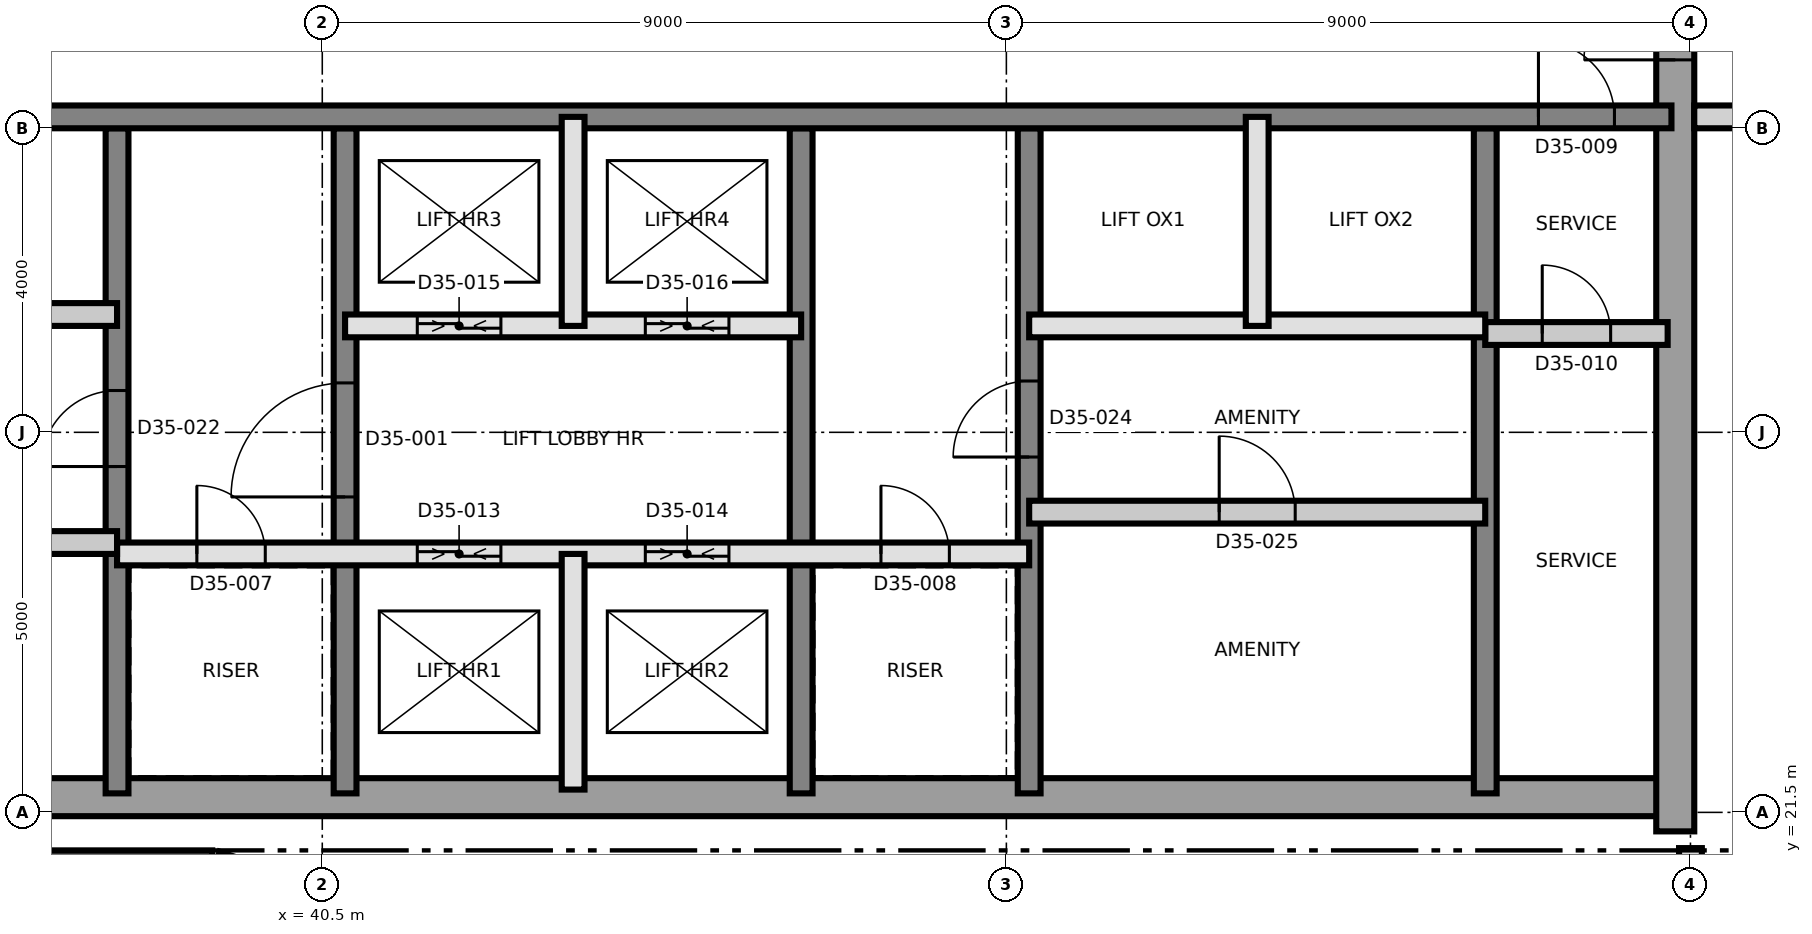
"""IFC4 building model, lengths in metres.
Left out: names, types, materials, properties, quantities, classifications, styles, units other than length and angle.
Written with IfcOpenShell. Run it as: python <this file> out.ifc"""

import sys

from ifc_helpers import new_model, si_unit, direction, frame, frame_2d, origin, place, context, subcontext, project, spatial, rectangle, extrude, element, fill, save


model = new_model("IFC4")
c1 = context("Model", 3, precision=1e-05, world=origin(), true_north=direction((0.0, 1.0)))
c2 = subcontext(c1, "Body", "Model", "MODEL_VIEW")
j1 = project(units=[si_unit("LENGTHUNIT", "METRE"), si_unit("PLANEANGLEUNIT", "RADIAN")], contexts=[c1])
p1 = place(None, origin())
s1 = spatial("IfcSite", under=j1, at=p1, CompositionType="ELEMENT")
p2 = place(p1, origin())
s2 = spatial("IfcBuilding", under=s1, at=p2, CompositionType="ELEMENT")
p3 = place(p2, frame((0.0, 0.0, 195.8)))
s3 = spatial("IfcBuildingStorey", under=s2, at=p3, CompositionType="ELEMENT", Elevation=195.8)
p4 = place(p3, frame((31.25, 21.7, 0.0), z_axis=(0.0, 0.0, 1.0), x_axis=(1.0, 0.0, 0.0)))
e1 = element("IfcWall", 1, at=p4, inside=s3, PredefinedType="SHEAR", context=c2, shape_type="SweptSolid", body=[
    extrude(rectangle(XDim=27.0, YDim=0.5, at=frame_2d((13.5, 0.0))), origin(), (0.0, 0.0, 1.0), 3.7),
])
p5 = place(p3, frame((58.3, 21.25, 0.0), z_axis=(0.0, 0.0, 1.0), x_axis=(0.0, 1.0, 0.0)))
e2 = element("IfcWall", 2, at=p5, inside=s3, PredefinedType="SHEAR", context=c2, shape_type="SweptSolid", body=[
    extrude(rectangle(XDim=18.5, YDim=0.5, at=frame_2d((9.25, 0.0))), origin(), (0.0, 0.0, 1.0), 3.7),
])
p6 = place(p5, frame((10.15, 0.0, 0.0)))
e3 = element("IfcOpeningElement", 3, at=p6, cuts=e2, PredefinedType="OPENING", context=c2, shape_type="SweptSolid", body=[
    extrude(rectangle(XDim=1.2, YDim=2.1, at=frame_2d((0.6, 1.05))), frame((0.0, 0.26, 0.0), z_axis=(0.0, -1.0, 0.0), x_axis=(1.0, 0.0, 0.0)), (0.0, 0.0, 1.0), 0.52),
])
p7 = place(p3, frame((37.8, 21.75, 0.0), z_axis=(0.0, 0.0, 1.0), x_axis=(0.0, 1.0, 0.0)))
e4 = element("IfcWall", 4, at=p7, inside=s3, PredefinedType="SHEAR", context=c2, shape_type="SweptSolid", body=[
    extrude(rectangle(XDim=8.75, YDim=0.3, at=frame_2d((4.375, 0.0))), origin(), (0.0, 0.0, 1.0), 3.7),
])
p8 = place(p7, frame((4.3, 0.0, 0.0)))
e5 = element("IfcOpeningElement", 5, at=p8, cuts=e4, PredefinedType="OPENING", context=c2, shape_type="SweptSolid", body=[
    extrude(rectangle(XDim=1.0, YDim=2.1, at=frame_2d((0.5, 1.05))), frame((0.0, 0.16, 0.0), z_axis=(0.0, -1.0, 0.0), x_axis=(1.0, 0.0, 0.0)), (0.0, 0.0, 1.0), 0.32),
])
p9 = place(p3, frame((40.8, 21.75, 0.0), z_axis=(0.0, 0.0, 1.0), x_axis=(0.0, 1.0, 0.0)))
e6 = element("IfcWall", 6, at=p9, inside=s3, PredefinedType="SHEAR", context=c2, shape_type="SweptSolid", body=[
    extrude(rectangle(XDim=8.75, YDim=0.3, at=frame_2d((4.375, 0.0))), origin(), (0.0, 0.0, 1.0), 3.7),
])
p10 = place(p9, frame((3.9, 0.0, 0.0)))
e7 = element("IfcOpeningElement", 7, at=p10, cuts=e6, PredefinedType="OPENING", context=c2, shape_type="SweptSolid", body=[
    extrude(rectangle(XDim=1.5, YDim=2.1, at=frame_2d((0.75, 1.05))), frame((0.0, 0.16, 0.0), z_axis=(0.0, -1.0, 0.0), x_axis=(1.0, 0.0, 0.0)), (0.0, 0.0, 1.0), 0.32),
])
p11 = place(p3, frame((46.8, 21.75, 0.0), z_axis=(0.0, 0.0, 1.0), x_axis=(0.0, 1.0, 0.0)))
e8 = element("IfcWall", 8, at=p11, inside=s3, PredefinedType="SHEAR", context=c2, shape_type="SweptSolid", body=[
    extrude(rectangle(XDim=8.75, YDim=0.3, at=frame_2d((4.375, 0.0))), origin(), (0.0, 0.0, 1.0), 3.7),
])
p12 = place(p3, frame((49.8, 21.75, 0.0), z_axis=(0.0, 0.0, 1.0), x_axis=(0.0, 1.0, 0.0)))
e9 = element("IfcWall", 9, at=p12, inside=s3, PredefinedType="SHEAR", context=c2, shape_type="SweptSolid", body=[
    extrude(rectangle(XDim=8.75, YDim=0.3, at=frame_2d((4.375, 0.0))), origin(), (0.0, 0.0, 1.0), 3.7),
])
p13 = place(p12, frame((4.425, 0.0, 0.0)))
e10 = element("IfcOpeningElement", 10, at=p13, cuts=e9, PredefinedType="OPENING", context=c2, shape_type="SweptSolid", body=[
    extrude(rectangle(XDim=1.0, YDim=2.1, at=frame_2d((0.5, 1.05))), frame((0.0, 0.16, 0.0), z_axis=(0.0, -1.0, 0.0), x_axis=(1.0, 0.0, 0.0)), (0.0, 0.0, 1.0), 0.32),
])
p14 = place(p3, frame((55.8, 21.75, 0.0), z_axis=(0.0, 0.0, 1.0), x_axis=(0.0, 1.0, 0.0)))
e11 = element("IfcWall", 11, at=p14, inside=s3, PredefinedType="SHEAR", context=c2, shape_type="SweptSolid", body=[
    extrude(rectangle(XDim=8.75, YDim=0.3, at=frame_2d((4.375, 0.0))), origin(), (0.0, 0.0, 1.0), 3.7),
])
p15 = place(p3, frame((31.75, 30.65, 0.0), z_axis=(0.0, 0.0, 1.0), x_axis=(1.0, 0.0, 0.0)))
e12 = element("IfcWall", 12, at=p15, inside=s3, PredefinedType="SHEAR", context=c2, shape_type="SweptSolid", body=[
    extrude(rectangle(XDim=26.5, YDim=0.3, at=frame_2d((13.25, 0.0))), origin(), (0.0, 0.0, 1.0), 3.7),
])
p16 = place(p15, frame((24.75, 0.0, 0.0)))
e13 = element("IfcOpeningElement", 13, at=p16, cuts=e12, PredefinedType="OPENING", context=c2, shape_type="SweptSolid", body=[
    extrude(rectangle(XDim=1.0, YDim=2.1, at=frame_2d((0.5, 1.05))), frame((0.0, 0.16, 0.0), z_axis=(0.0, -1.0, 0.0), x_axis=(1.0, 0.0, 0.0)), (0.0, 0.0, 1.0), 0.32),
])
p17 = place(p15, frame((4.05, 0.0, 0.0)))
e14 = element("IfcOpeningElement", 14, at=p17, cuts=e12, PredefinedType="OPENING", context=c2, shape_type="SweptSolid", body=[
    extrude(rectangle(XDim=1.0, YDim=2.1, at=frame_2d((0.5, 1.05))), frame((0.0, 0.16, 0.0), z_axis=(0.0, -1.0, 0.0), x_axis=(1.0, 0.0, 0.0)), (0.0, 0.0, 1.0), 0.32),
])
p18 = place(p3, frame((31.36, 20.85, 0.0), z_axis=(0.0, 0.0, 1.0), x_axis=(1.0, 0.0, 0.0)))
e15 = element("IfcWall", 15, at=p18, inside=s3, PredefinedType="SOLIDWALL", context=c2, shape_type="SweptSolid", body=[
    extrude(rectangle(XDim=7.693, YDim=0.3, at=frame_2d((3.846, 0.0))), origin(), (0.0, 0.0, 1.0), 3.4),
])
p19 = place(p3, frame((39.101, 20.842, 0.0), z_axis=(0.0, 0.0, 1.0), x_axis=(0.946930456305, -0.32143850255, 0.0)))
e16 = element("IfcWall", 16, at=p19, inside=s3, PredefinedType="SOLIDWALL", context=c2, shape_type="SweptSolid", body=[
    extrude(rectangle(XDim=1.32, YDim=0.3, at=frame_2d((0.66, 0.0))), origin(), (0.0, 0.0, 1.0), 3.4),
])
p20 = place(p3, frame((37.8, 24.9, 0.0), z_axis=(0.0, 0.0, 1.0), x_axis=(1.0, 0.0, 0.0)))
e17 = element("IfcWall", 17, at=p20, inside=s3, PredefinedType="SOLIDWALL", context=c2, shape_type="SweptSolid", body=[
    extrude(rectangle(XDim=12.0, YDim=0.3, at=frame_2d((6.0, 0.0))), origin(), (0.0, 0.0, 1.0), 3.4),
])
p21 = place(p20, frame((1.05, 0.0, 0.0)))
e18 = element("IfcOpeningElement", 18, at=p21, cuts=e17, PredefinedType="OPENING", context=c2, shape_type="SweptSolid", body=[
    extrude(rectangle(XDim=0.9, YDim=2.1, at=frame_2d((0.45, 1.05))), frame((0.0, 0.16, 0.0), z_axis=(0.0, -1.0, 0.0), x_axis=(1.0, 0.0, 0.0)), (0.0, 0.0, 1.0), 0.32),
])
p22 = place(p20, frame((10.05, 0.0, 0.0)))
e19 = element("IfcOpeningElement", 19, at=p22, cuts=e17, PredefinedType="OPENING", context=c2, shape_type="SweptSolid", body=[
    extrude(rectangle(XDim=0.9, YDim=2.1, at=frame_2d((0.45, 1.05))), frame((0.0, 0.16, 0.0), z_axis=(0.0, -1.0, 0.0), x_axis=(1.0, 0.0, 0.0)), (0.0, 0.0, 1.0), 0.32),
])
p23 = place(p20, frame((3.95, 0.0, 0.0)))
e20 = element("IfcOpeningElement", 20, at=p23, cuts=e17, PredefinedType="OPENING", context=c2, shape_type="SweptSolid", body=[
    extrude(rectangle(XDim=1.1, YDim=2.4, at=frame_2d((0.55, 1.2))), frame((0.0, 0.16, 0.0), z_axis=(0.0, -1.0, 0.0), x_axis=(1.0, 0.0, 0.0)), (0.0, 0.0, 1.0), 0.32),
])
p24 = place(p20, frame((6.95, 0.0, 0.0)))
e21 = element("IfcOpeningElement", 21, at=p24, cuts=e17, PredefinedType="OPENING", context=c2, shape_type="SweptSolid", body=[
    extrude(rectangle(XDim=1.1, YDim=2.4, at=frame_2d((0.55, 1.2))), frame((0.0, 0.16, 0.0), z_axis=(0.0, -1.0, 0.0), x_axis=(1.0, 0.0, 0.0)), (0.0, 0.0, 1.0), 0.32),
])
p25 = place(p3, frame((31.8, 25.05, 0.0), z_axis=(0.0, 0.0, 1.0), x_axis=(1.0, 0.0, 0.0)))
e22 = element("IfcWall", 22, at=p25, inside=s3, PredefinedType="PARTITIONING", context=c2, shape_type="SweptSolid", body=[
    extrude(rectangle(XDim=6.0, YDim=0.3, at=frame_2d((3.0, 0.0))), origin(), (0.0, 0.0, 1.0), 3.4),
])
p26 = place(p25, frame((2.5, 0.0, 0.0)))
e23 = element("IfcOpeningElement", 23, at=p26, cuts=e22, PredefinedType="OPENING", context=c2, shape_type="SweptSolid", body=[
    extrude(rectangle(XDim=1.0, YDim=2.1, at=frame_2d((0.5, 1.05))), frame((0.0, 0.16, 0.0), z_axis=(0.0, -1.0, 0.0), x_axis=(1.0, 0.0, 0.0)), (0.0, 0.0, 1.0), 0.32),
])
p27 = place(p3, frame((49.8, 25.45, 0.0), z_axis=(0.0, 0.0, 1.0), x_axis=(1.0, 0.0, 0.0)))
e24 = element("IfcWall", 24, at=p27, inside=s3, PredefinedType="PARTITIONING", context=c2, shape_type="SweptSolid", body=[
    extrude(rectangle(XDim=6.0, YDim=0.3, at=frame_2d((3.0, 0.0))), origin(), (0.0, 0.0, 1.0), 3.4),
])
p28 = place(p27, frame((2.5, 0.0, 0.0)))
e25 = element("IfcOpeningElement", 25, at=p28, cuts=e24, PredefinedType="OPENING", context=c2, shape_type="SweptSolid", body=[
    extrude(rectangle(XDim=1.0, YDim=2.1, at=frame_2d((0.5, 1.05))), frame((0.0, 0.16, 0.0), z_axis=(0.0, -1.0, 0.0), x_axis=(1.0, 0.0, 0.0)), (0.0, 0.0, 1.0), 0.32),
])
p29 = place(p3, frame((55.8, 27.8, 0.0), z_axis=(0.0, 0.0, 1.0), x_axis=(1.0, 0.0, 0.0)))
e26 = element("IfcWall", 26, at=p29, inside=s3, PredefinedType="PARTITIONING", context=c2, shape_type="SweptSolid", body=[
    extrude(rectangle(XDim=2.4, YDim=0.3, at=frame_2d((1.2, 0.0))), origin(), (0.0, 0.0, 1.0), 3.4),
])
p30 = place(p29, frame((0.75, 0.0, 0.0)))
e27 = element("IfcOpeningElement", 27, at=p30, cuts=e26, PredefinedType="OPENING", context=c2, shape_type="SweptSolid", body=[
    extrude(rectangle(XDim=0.9, YDim=2.1, at=frame_2d((0.45, 1.05))), frame((0.0, 0.16, 0.0), z_axis=(0.0, -1.0, 0.0), x_axis=(1.0, 0.0, 0.0)), (0.0, 0.0, 1.0), 0.32),
])
p31 = place(p3, frame((40.8, 27.9, 0.0), z_axis=(0.0, 0.0, 1.0), x_axis=(1.0, 0.0, 0.0)))
e28 = element("IfcWall", 28, at=p31, inside=s3, PredefinedType="SOLIDWALL", context=c2, shape_type="SweptSolid", body=[
    extrude(rectangle(XDim=6.0, YDim=0.3, at=frame_2d((3.0, 0.0))), origin(), (0.0, 0.0, 1.0), 3.4),
])
p32 = place(p31, frame((0.95, 0.0, 0.0)))
e29 = element("IfcOpeningElement", 29, at=p32, cuts=e28, PredefinedType="OPENING", context=c2, shape_type="SweptSolid", body=[
    extrude(rectangle(XDim=1.1, YDim=2.4, at=frame_2d((0.55, 1.2))), frame((0.0, 0.16, 0.0), z_axis=(0.0, -1.0, 0.0), x_axis=(1.0, 0.0, 0.0)), (0.0, 0.0, 1.0), 0.32),
])
p33 = place(p31, frame((3.95, 0.0, 0.0)))
e30 = element("IfcOpeningElement", 30, at=p33, cuts=e28, PredefinedType="OPENING", context=c2, shape_type="SweptSolid", body=[
    extrude(rectangle(XDim=1.1, YDim=2.4, at=frame_2d((0.55, 1.2))), frame((0.0, 0.16, 0.0), z_axis=(0.0, -1.0, 0.0), x_axis=(1.0, 0.0, 0.0)), (0.0, 0.0, 1.0), 0.32),
])
p34 = place(p3, frame((49.8, 27.9, 0.0), z_axis=(0.0, 0.0, 1.0), x_axis=(1.0, 0.0, 0.0)))
e31 = element("IfcWall", 31, at=p34, inside=s3, PredefinedType="SOLIDWALL", context=c2, shape_type="SweptSolid", body=[
    extrude(rectangle(XDim=6.0, YDim=0.3, at=frame_2d((3.0, 0.0))), origin(), (0.0, 0.0, 1.0), 3.4),
])
p35 = place(p3, frame((31.8, 28.05, 0.0), z_axis=(0.0, 0.0, 1.0), x_axis=(1.0, 0.0, 0.0)))
e32 = element("IfcWall", 32, at=p35, inside=s3, PredefinedType="PARTITIONING", context=c2, shape_type="SweptSolid", body=[
    extrude(rectangle(XDim=6.0, YDim=0.3, at=frame_2d((3.0, 0.0))), origin(), (0.0, 0.0, 1.0), 3.4),
])
p36 = place(p3, frame((43.8, 21.8, 0.0), z_axis=(0.0, 0.0, 1.0), x_axis=(0.0, 1.0, 0.0)))
e33 = element("IfcWall", 33, at=p36, inside=s3, PredefinedType="SOLIDWALL", context=c2, shape_type="SweptSolid", body=[
    extrude(rectangle(XDim=3.1, YDim=0.3, at=frame_2d((1.55, 0.0))), origin(), (0.0, 0.0, 1.0), 3.4),
])
for number, where, z_axis, x_axis in (
    (34, (43.8, 27.9, 0.0), (0.0, 0.0, 1.0), (0.0, 1.0, 0.0)),
    (35, (52.8, 27.9, 0.0), (0.0, 0.0, 1.0), (0.0, 1.0, 0.0)),
):
    element("IfcWall", number, at=place(p3, frame(where, z_axis=z_axis, x_axis=x_axis)), inside=s3, PredefinedType="SOLIDWALL", context=c2, shape_type="SweptSolid", body=[
        extrude(rectangle(XDim=2.75, YDim=0.3, at=frame_2d((1.375, 0.0))), origin(), (0.0, 0.0, 1.0), 3.4),
    ])
p37 = place(p3, frame((58.55, 30.65, 0.0), z_axis=(0.0, 0.0, 1.0), x_axis=(1.0, 0.0, 0.0)))
e36 = element("IfcWall", 36, at=p37, inside=s3, PredefinedType="PARTITIONING", context=c2, shape_type="SweptSolid", body=[
    extrude(rectangle(XDim=26.78, YDim=0.3, at=frame_2d((13.39, 0.0))), origin(), (0.0, 0.0, 1.0), 3.4),
])
p38 = place(p37, frame((1.65, 0.0, 0.0)))
e37 = element("IfcOpeningElement", 37, at=p38, cuts=e36, PredefinedType="OPENING", context=c2, shape_type="SweptSolid", body=[
    extrude(rectangle(XDim=1.2, YDim=2.1, at=frame_2d((0.6, 1.05))), frame((0.0, 0.16, 0.0), z_axis=(0.0, -1.0, 0.0), x_axis=(1.0, 0.0, 0.0)), (0.0, 0.0, 1.0), 0.32),
])
p39 = place(p37, frame((4.9, 0.0, 0.0)))
e38 = element("IfcOpeningElement", 38, at=p39, cuts=e36, PredefinedType="OPENING", context=c2, shape_type="SweptSolid", body=[
    extrude(rectangle(XDim=1.0, YDim=2.1, at=frame_2d((0.5, 1.05))), frame((0.0, 0.16, 0.0), z_axis=(0.0, -1.0, 0.0), x_axis=(1.0, 0.0, 0.0)), (0.0, 0.0, 1.0), 0.32),
])
p40 = place(p37, frame((10.085, 0.0, 0.0)))
e39 = element("IfcOpeningElement", 39, at=p40, cuts=e36, PredefinedType="OPENING", context=c2, shape_type="SweptSolid", body=[
    extrude(rectangle(XDim=1.2, YDim=2.1, at=frame_2d((0.6, 1.05))), frame((0.0, 0.16, 0.0), z_axis=(0.0, -1.0, 0.0), x_axis=(1.0, 0.0, 0.0)), (0.0, 0.0, 1.0), 0.32),
])
p41 = place(p37, frame((13.335, 0.0, 0.0)))
e40 = element("IfcOpeningElement", 40, at=p41, cuts=e36, PredefinedType="OPENING", context=c2, shape_type="SweptSolid", body=[
    extrude(rectangle(XDim=1.0, YDim=2.1, at=frame_2d((0.5, 1.05))), frame((0.0, 0.16, 0.0), z_axis=(0.0, -1.0, 0.0), x_axis=(1.0, 0.0, 0.0)), (0.0, 0.0, 1.0), 0.32),
])
p42 = place(p37, frame((19.085, 0.0, 0.0)))
e41 = element("IfcOpeningElement", 41, at=p42, cuts=e36, PredefinedType="OPENING", context=c2, shape_type="SweptSolid", body=[
    extrude(rectangle(XDim=1.2, YDim=2.1, at=frame_2d((0.6, 1.05))), frame((0.0, 0.16, 0.0), z_axis=(0.0, -1.0, 0.0), x_axis=(1.0, 0.0, 0.0)), (0.0, 0.0, 1.0), 0.32),
])
p43 = place(p37, frame((22.335, 0.0, 0.0)))
e42 = element("IfcOpeningElement", 42, at=p43, cuts=e36, PredefinedType="OPENING", context=c2, shape_type="SweptSolid", body=[
    extrude(rectangle(XDim=1.0, YDim=2.1, at=frame_2d((0.5, 1.05))), frame((0.0, 0.16, 0.0), z_axis=(0.0, -1.0, 0.0), x_axis=(1.0, 0.0, 0.0)), (0.0, 0.0, 1.0), 0.32),
])
p44 = place(p3, frame((58.5, 20.135, 0.0), z_axis=(0.0, 0.0, 1.0), x_axis=(0.0, 1.0, 0.0)))
e43 = element("IfcWall", 43, at=p44, inside=s3, PredefinedType="PARTITIONING", context=c2, shape_type="SweptSolid", body=[
    extrude(rectangle(XDim=0.895, YDim=0.3, at=frame_2d((0.448, 0.0))), origin(), (0.0, 0.0, 1.0), 3.4),
])
p45 = place(p10, origin())
e44 = element("IfcDoor", 44, at=p45, inside=s3, OperationType="SINGLE_SWING_RIGHT", PredefinedType="DOOR", context=c2, shape_type="SweptSolid", body=[
    extrude(rectangle(XDim=1.5, YDim=2.1, at=frame_2d((0.75, 1.05))), frame((0.0, 0.025, 0.0), z_axis=(0.0, -1.0, 0.0), x_axis=(1.0, 0.0, 0.0)), (0.0, 0.0, 1.0), 0.05),
])
fill(e7, e44)
p46 = place(p21, origin())
e45 = element("IfcDoor", 45, at=p46, inside=s3, OperationType="SINGLE_SWING_LEFT", PredefinedType="DOOR", context=c2, shape_type="SweptSolid", body=[
    extrude(rectangle(XDim=0.9, YDim=2.1, at=frame_2d((0.45, 1.05))), frame((0.0, 0.025, 0.0), z_axis=(0.0, -1.0, 0.0), x_axis=(1.0, 0.0, 0.0)), (0.0, 0.0, 1.0), 0.05),
])
fill(e18, e45)
p47 = place(p22, origin())
e46 = element("IfcDoor", 46, at=p47, inside=s3, OperationType="SINGLE_SWING_RIGHT", PredefinedType="DOOR", context=c2, shape_type="SweptSolid", body=[
    extrude(rectangle(XDim=0.9, YDim=2.1, at=frame_2d((0.45, 1.05))), frame((0.0, 0.025, 0.0), z_axis=(0.0, -1.0, 0.0), x_axis=(1.0, 0.0, 0.0)), (0.0, 0.0, 1.0), 0.05),
])
fill(e19, e46)
p48 = place(p16, origin())
e47 = element("IfcDoor", 47, at=p48, inside=s3, OperationType="SINGLE_SWING_LEFT", PredefinedType="DOOR", context=c2, shape_type="SweptSolid", body=[
    extrude(rectangle(XDim=1.0, YDim=2.1, at=frame_2d((0.5, 1.05))), frame((0.0, 0.025, 0.0), z_axis=(0.0, -1.0, 0.0), x_axis=(1.0, 0.0, 0.0)), (0.0, 0.0, 1.0), 0.05),
])
fill(e13, e47)
p49 = place(p30, origin())
e48 = element("IfcDoor", 48, at=p49, inside=s3, OperationType="SINGLE_SWING_RIGHT", PredefinedType="DOOR", context=c2, shape_type="SweptSolid", body=[
    extrude(rectangle(XDim=0.9, YDim=2.1, at=frame_2d((0.45, 1.05))), frame((0.0, 0.025, 0.0), z_axis=(0.0, -1.0, 0.0), x_axis=(1.0, 0.0, 0.0)), (0.0, 0.0, 1.0), 0.05),
])
fill(e27, e48)
p50 = place(p6, origin())
e49 = element("IfcDoor", 49, at=p50, inside=s3, OperationType="SINGLE_SWING_LEFT", PredefinedType="DOOR", context=c2, shape_type="SweptSolid", body=[
    extrude(rectangle(XDim=1.2, YDim=2.1, at=frame_2d((0.6, 1.05))), frame((0.0, 0.025, 0.0), z_axis=(0.0, -1.0, 0.0), x_axis=(1.0, 0.0, 0.0)), (0.0, 0.0, 1.0), 0.05),
])
fill(e3, e49)
p51 = place(p23, origin())
e50 = element("IfcDoor", 50, at=p51, inside=s3, OperationType="SLIDING_TO_LEFT", PredefinedType="DOOR", context=c2, shape_type="SweptSolid", body=[
    extrude(rectangle(XDim=1.1, YDim=2.4, at=frame_2d((0.55, 1.2))), frame((0.0, 0.025, 0.0), z_axis=(0.0, -1.0, 0.0), x_axis=(1.0, 0.0, 0.0)), (0.0, 0.0, 1.0), 0.05),
])
fill(e20, e50)
p52 = place(p24, origin())
e51 = element("IfcDoor", 51, at=p52, inside=s3, OperationType="SLIDING_TO_LEFT", PredefinedType="DOOR", context=c2, shape_type="SweptSolid", body=[
    extrude(rectangle(XDim=1.1, YDim=2.4, at=frame_2d((0.55, 1.2))), frame((0.0, 0.025, 0.0), z_axis=(0.0, -1.0, 0.0), x_axis=(1.0, 0.0, 0.0)), (0.0, 0.0, 1.0), 0.05),
])
fill(e21, e51)
p53 = place(p32, origin())
e52 = element("IfcDoor", 52, at=p53, inside=s3, OperationType="SLIDING_TO_LEFT", PredefinedType="DOOR", context=c2, shape_type="SweptSolid", body=[
    extrude(rectangle(XDim=1.1, YDim=2.4, at=frame_2d((0.55, 1.2))), frame((0.0, 0.025, 0.0), z_axis=(0.0, -1.0, 0.0), x_axis=(1.0, 0.0, 0.0)), (0.0, 0.0, 1.0), 0.05),
])
fill(e29, e52)
p54 = place(p33, origin())
e53 = element("IfcDoor", 53, at=p54, inside=s3, OperationType="SLIDING_TO_LEFT", PredefinedType="DOOR", context=c2, shape_type="SweptSolid", body=[
    extrude(rectangle(XDim=1.1, YDim=2.4, at=frame_2d((0.55, 1.2))), frame((0.0, 0.025, 0.0), z_axis=(0.0, -1.0, 0.0), x_axis=(1.0, 0.0, 0.0)), (0.0, 0.0, 1.0), 0.05),
])
fill(e30, e53)
p55 = place(p8, origin())
e54 = element("IfcDoor", 54, at=p55, inside=s3, OperationType="SINGLE_SWING_RIGHT", PredefinedType="DOOR", context=c2, shape_type="SweptSolid", body=[
    extrude(rectangle(XDim=1.0, YDim=2.1, at=frame_2d((0.5, 1.05))), frame((0.0, 0.025, 0.0), z_axis=(0.0, -1.0, 0.0), x_axis=(1.0, 0.0, 0.0)), (0.0, 0.0, 1.0), 0.05),
])
fill(e5, e54)
p56 = place(p13, origin())
e55 = element("IfcDoor", 55, at=p56, inside=s3, OperationType="SINGLE_SWING_RIGHT", PredefinedType="DOOR", context=c2, shape_type="SweptSolid", body=[
    extrude(rectangle(XDim=1.0, YDim=2.1, at=frame_2d((0.5, 1.05))), frame((0.0, 0.025, 0.0), z_axis=(0.0, -1.0, 0.0), x_axis=(1.0, 0.0, 0.0)), (0.0, 0.0, 1.0), 0.05),
])
fill(e10, e55)
p57 = place(p28, origin())
e56 = element("IfcDoor", 56, at=p57, inside=s3, OperationType="SINGLE_SWING_RIGHT", PredefinedType="DOOR", context=c2, shape_type="SweptSolid", body=[
    extrude(rectangle(XDim=1.0, YDim=2.1, at=frame_2d((0.5, 1.05))), frame((0.0, 0.025, 0.0), z_axis=(0.0, -1.0, 0.0), x_axis=(1.0, 0.0, 0.0)), (0.0, 0.0, 1.0), 0.05),
])
fill(e25, e56)
save(model, sys.argv[1])
